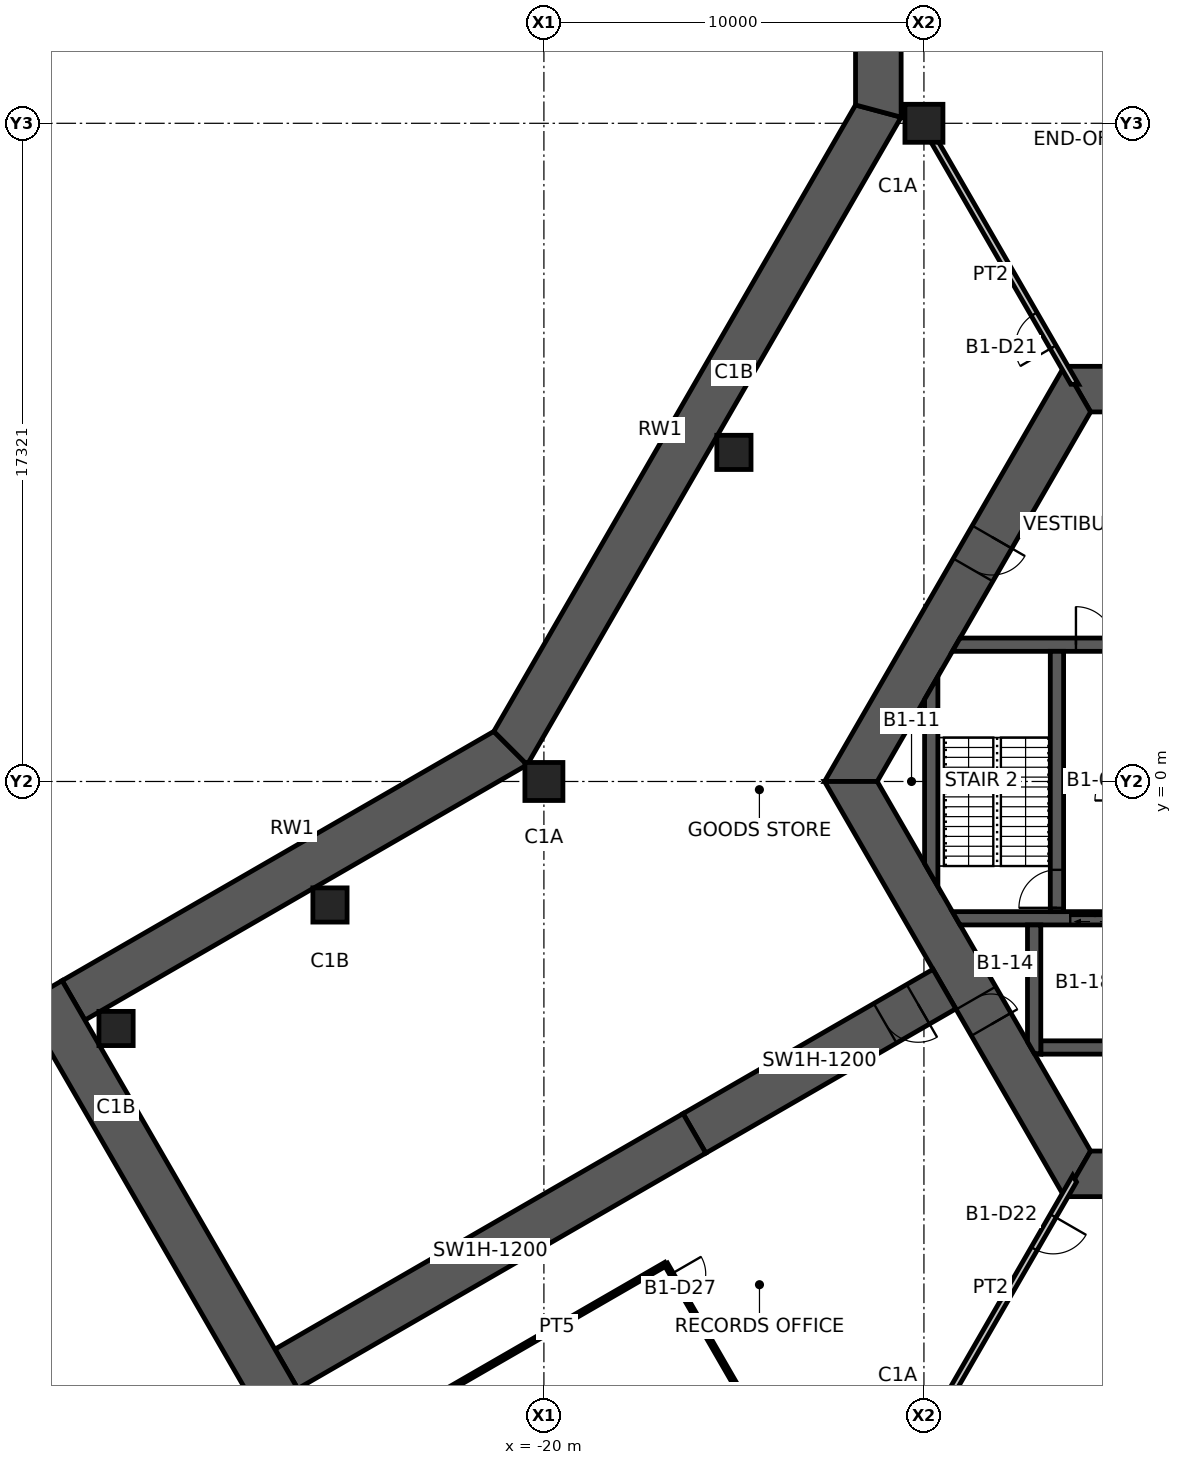
"""IFC4 building model, lengths in metres.
Left out: names, types, materials, properties, quantities, classifications, styles, units other than length and angle.
Written with IfcOpenShell. Run it as: python <this file> out.ifc"""

import sys

from ifc_helpers import new_model, si_unit, direction, frame, frame_2d, origin, origin_2d, place, context, subcontext, project, spatial, polyline, rectangle, hollow_rectangle, outline, extrude, element, fill, save


model = new_model("IFC4")
c1 = context("Model", 3, precision=1e-05, world=origin(), true_north=direction((0.0, 1.0)))
c2 = subcontext(c1, "Body", "Model", "MODEL_VIEW")
j1 = project(units=[si_unit("LENGTHUNIT", "METRE"), si_unit("PLANEANGLEUNIT", "RADIAN")], contexts=[c1])
p1 = place(None, origin())
s1 = spatial("IfcSite", under=j1, at=p1, CompositionType="ELEMENT")
p2 = place(p1, origin())
s2 = spatial("IfcBuilding", under=s1, at=p2, CompositionType="ELEMENT")
p3 = place(p2, frame((0.0, 0.0, -5.0)))
s3 = spatial("IfcBuildingStorey", under=s2, at=p3, CompositionType="ELEMENT", Elevation=-5.0)
for number, where, z_axis, x_axis in (
    (1, (-10.0, 17.321, 0.0), (0.0, 0.0, 1.0), (1.0, 0.0, 0.0)),
    (2, (-20.0, 0.0, 0.0), (0.0, 0.0, 1.0), (1.0, 0.0, 0.0)),
):
    element("IfcColumn", number, at=place(p3, frame(where, z_axis=z_axis, x_axis=x_axis)), inside=s3, PredefinedType="COLUMN", context=c2, shape_type="SweptSolid", body=[
        extrude(hollow_rectangle(XDim=1.0, YDim=1.0, WallThickness=0.06, at=origin_2d()), origin(), (0.0, 0.0, 1.0), 5.0),
    ])
for number, where, z_axis, x_axis in (
    (3, (-15.0, 8.66, 0.0), (0.0, 0.0, 1.0), (1.0, 0.0, 0.0)),
    (4, (-25.629, -3.25, 0.0), (0.0, 0.0, 1.0), (1.0, 0.0, 0.0)),
    (5, (-31.258, -6.5, 0.0), (0.0, 0.0, 1.0), (1.0, 0.0, 0.0)),
):
    element("IfcColumn", number, at=place(p3, frame(where, z_axis=z_axis, x_axis=x_axis)), inside=s3, PredefinedType="COLUMN", context=c2, shape_type="SweptSolid", body=[
        extrude(hollow_rectangle(XDim=0.9, YDim=0.9, WallThickness=0.05, at=origin_2d()), origin(), (0.0, 0.0, 1.0), 5.0),
    ])
p4 = place(p3, frame((5.961, 10.325, 0.0), z_axis=(0.0, 0.0, 1.0), x_axis=(-1.0, 0.0, 0.0)))
e6 = element("IfcWall", 6, at=p4, inside=s3, PredefinedType="SHEAR", context=c2, shape_type="SweptSolid", body=[
    extrude(outline(polyline([(-0.346, -0.6), (4.574, -0.6), (5.374, -0.6), (6.549, -0.6), (7.349, -0.6), (12.269, -0.6), (11.576, 0.6), (7.349, 0.6), (6.549, 0.6), (5.374, 0.6), (4.574, 0.6), (0.346, 0.6), (-0.346, -0.6)])), origin(), (0.0, 0.0, 1.0), 5.0),
])
p5 = place(p4, frame((6.549, 0.0, 0.0)))
e7 = element("IfcOpeningElement", 7, at=p5, cuts=e6, PredefinedType="OPENING", context=c2, shape_type="SweptSolid", body=[
    extrude(rectangle(XDim=0.8, YDim=2.1, at=frame_2d((0.4, 1.05))), frame((0.0, 0.61, 0.0), z_axis=(0.0, -1.0, 0.0), x_axis=(1.0, 0.0, 0.0)), (0.0, 0.0, 1.0), 1.22),
])
p6 = place(p4, frame((4.574, 0.0, 0.0)))
e8 = element("IfcOpeningElement", 8, at=p6, cuts=e6, PredefinedType="OPENING", context=c2, shape_type="SweptSolid", body=[
    extrude(rectangle(XDim=0.8, YDim=2.1, at=frame_2d((0.4, 1.05))), frame((0.0, 0.61, 0.0), z_axis=(0.0, -1.0, 0.0), x_axis=(1.0, 0.0, 0.0)), (0.0, 0.0, 1.0), 1.22),
])
p7 = place(p3, frame((-5.961, 10.325, 0.0), z_axis=(0.0, 0.0, 1.0), x_axis=(-0.500004296715, -0.866022923061, 0.0)))
e9 = element("IfcWall", 9, at=p7, inside=s3, PredefinedType="SHEAR", context=c2, shape_type="SweptSolid", body=[
    extrude(outline(polyline([(-0.346, -0.6), (4.494, -0.6), (5.494, -0.6), (12.269, -0.6), (11.576, 0.6), (5.494, 0.6), (4.494, 0.6), (0.346, 0.6), (-0.346, -0.6)])), origin(), (0.0, 0.0, 1.0), 5.0),
])
p8 = place(p7, frame((4.494, 0.0, 0.0)))
e10 = element("IfcOpeningElement", 10, at=p8, cuts=e9, PredefinedType="OPENING", context=c2, shape_type="SweptSolid", body=[
    extrude(rectangle(XDim=1.0, YDim=2.1, at=frame_2d((0.5, 1.05))), frame((0.0, 0.61, 0.0), z_axis=(0.0, -1.0, 0.0), x_axis=(1.0, 0.0, 0.0)), (0.0, 0.0, 1.0), 1.22),
])
p9 = place(p3, frame((-11.922, 0.0, 0.0), z_axis=(0.0, 0.0, 1.0), x_axis=(0.500004296715, -0.866022923061, 0.0)))
e11 = element("IfcWall", 11, at=p9, inside=s3, PredefinedType="SHEAR", context=c2, shape_type="SweptSolid", body=[
    extrude(outline(polyline([(-0.346, -0.6), (6.581, -0.6), (7.381, -0.6), (12.269, -0.6), (11.576, 0.6), (7.381, 0.6), (6.581, 0.6), (0.346, 0.6), (-0.346, -0.6)])), origin(), (0.0, 0.0, 1.0), 5.0),
])
p10 = place(p9, frame((6.581, 0.0, 0.0)))
e12 = element("IfcOpeningElement", 12, at=p10, cuts=e11, PredefinedType="OPENING", context=c2, shape_type="SweptSolid", body=[
    extrude(rectangle(XDim=0.8, YDim=2.1, at=frame_2d((0.4, 1.05))), frame((0.0, 0.61, 0.0), z_axis=(0.0, -1.0, 0.0), x_axis=(1.0, 0.0, 0.0)), (0.0, 0.0, 1.0), 1.22),
])
p11 = place(p3, frame((-5.961, -10.325, 0.0), z_axis=(0.0, 0.0, 1.0), x_axis=(1.0, 0.0, 0.0)))
e13 = element("IfcWall", 13, at=p11, inside=s3, PredefinedType="SHEAR", context=c2, shape_type="SweptSolid", body=[
    extrude(outline(polyline([(-0.346, -0.6), (5.461, -0.6), (6.461, -0.6), (12.269, -0.6), (11.576, 0.6), (6.461, 0.6), (5.461, 0.6), (0.346, 0.6), (-0.346, -0.6)])), origin(), (0.0, 0.0, 1.0), 5.0),
])
p12 = place(p11, frame((5.461, 0.0, 0.0)))
e14 = element("IfcOpeningElement", 14, at=p12, cuts=e13, PredefinedType="OPENING", context=c2, shape_type="SweptSolid", body=[
    extrude(rectangle(XDim=1.0, YDim=2.1, at=frame_2d((0.5, 1.05))), frame((0.0, 0.61, 0.0), z_axis=(0.0, -1.0, 0.0), x_axis=(1.0, 0.0, 0.0)), (0.0, 0.0, 1.0), 1.22),
])
p13 = place(p3, frame((-9.461, -5.462, 0.0), z_axis=(0.0, 0.0, 1.0), x_axis=(-0.866019116917, -0.500010889016, 0.0)))
e15 = element("IfcWall", 15, at=p13, inside=s3, PredefinedType="SHEAR", context=c2, shape_type="SweptSolid", body=[
    extrude(rectangle(XDim=7.595, YDim=1.2, at=frame_2d((3.798, 0.0))), origin(), (0.0, 0.0, 1.0), 5.0),
])
p14 = place(p13, frame((0.8, 0.0, 0.0)))
e16 = element("IfcOpeningElement", 16, at=p14, cuts=e15, PredefinedType="OPENING", context=c2, shape_type="SweptSolid", body=[
    extrude(rectangle(XDim=1.0, YDim=2.1, at=frame_2d((0.5, 1.05))), frame((0.0, 0.61, 0.0), z_axis=(0.0, -1.0, 0.0), x_axis=(1.0, 0.0, 0.0)), (0.0, 0.0, 1.0), 1.22),
])
p15 = place(p3, frame((-16.039, -9.26, 0.0), z_axis=(0.0, 0.0, 1.0), x_axis=(-0.866023285932, -0.50000366821, 0.0)))
e17 = element("IfcWall", 17, at=p15, inside=s3, PredefinedType="SHEAR", context=c2, shape_type="SweptSolid", body=[
    extrude(rectangle(XDim=12.4, YDim=1.2, at=frame_2d((6.2, 0.0))), origin(), (0.0, 0.0, 1.0), 5.0),
])
p16 = place(p3, frame((-32.378, -5.761, 0.0), z_axis=(0.0, 0.0, 1.0), x_axis=(0.866028209229, 0.499995140796, 0.0)))
e18 = element("IfcWall", 18, at=p16, inside=s3, PredefinedType="SOLIDWALL", context=c2, shape_type="SweptSolid", body=[
    extrude(outline(polyline([(0.0, -0.6), (13.439, -0.6), (13.118, 0.6), (0.0, 0.6), (0.0, -0.6)])), origin(), (0.0, 0.0, 1.0), 5.0),
])
p17 = place(p3, frame((-20.878, 0.878, 0.0), z_axis=(0.0, 0.0, 1.0), x_axis=(0.499998307868, 0.866026380735, 0.0)))
e19 = element("IfcWall", 19, at=p17, inside=s3, PredefinedType="SOLIDWALL", context=c2, shape_type="SweptSolid", body=[
    extrude(outline(polyline([(-0.161, -0.6), (19.518, -0.6), (19.196, 0.6), (0.161, 0.6), (-0.161, -0.6)])), origin(), (0.0, 0.0, 1.0), 5.0),
])
p18 = place(p3, frame((-11.2, 17.642, 0.0), z_axis=(0.0, 0.0, 1.0), x_axis=(0.0, 1.0, 0.0)))
e20 = element("IfcWall", 20, at=p18, inside=s3, PredefinedType="SOLIDWALL", context=c2, shape_type="SweptSolid", body=[
    extrude(outline(polyline([(-0.161, -0.6), (13.278, -0.6), (13.278, 0.6), (0.161, 0.6), (-0.161, -0.6)])), origin(), (0.0, 0.0, 1.0), 5.0),
])
p19 = place(p3, frame((-21.397, -25.979, 0.0), z_axis=(0.0, 0.0, 1.0), x_axis=(-0.500005427746, 0.866022270051, 0.0)))
e21 = element("IfcWall", 21, at=p19, inside=s3, PredefinedType="SOLIDWALL", context=c2, shape_type="SweptSolid", body=[
    extrude(rectangle(XDim=23.6, YDim=1.2, at=frame_2d((11.8, 0.0))), origin(), (0.0, 0.0, 1.0), 5.0),
])
p20 = place(p3, frame((-9.151, 3.6, 0.0), z_axis=(0.0, 0.0, 1.0), x_axis=(1.0, 0.0, 0.0)))
e22 = element("IfcWall", 22, at=p20, inside=s3, PredefinedType="SHEAR", context=c2, shape_type="SweptSolid", body=[
    extrude(outline(polyline([(-0.101, -0.175), (3.151, -0.175), (4.151, -0.175), (7.726, -0.175), (7.726, 0.175), (4.151, 0.175), (3.151, 0.175), (0.101, 0.175), (-0.101, -0.175)])), origin(), (0.0, 0.0, 1.0), 5.0),
])
p21 = place(p20, frame((3.151, 0.0, 0.0)))
e23 = element("IfcOpeningElement", 23, at=p21, cuts=e22, PredefinedType="OPENING", context=c2, shape_type="SweptSolid", body=[
    extrude(rectangle(XDim=1.0, YDim=2.1, at=frame_2d((0.5, 1.05))), frame((0.0, 0.185, 0.0), z_axis=(0.0, -1.0, 0.0), x_axis=(1.0, 0.0, 0.0)), (0.0, 0.0, 1.0), 0.37),
])
p22 = place(p3, frame((-9.151, -3.6, 0.0), z_axis=(0.0, 0.0, 1.0), x_axis=(1.0, 0.0, 0.0)))
e24 = element("IfcWall", 24, at=p22, inside=s3, PredefinedType="SHEAR", context=c2, shape_type="SweptSolid", body=[
    extrude(outline(polyline([(0.101, -0.175), (3.001, -0.175), (4.301, -0.175), (7.726, -0.175), (7.726, 0.175), (4.301, 0.175), (3.001, 0.175), (-0.101, 0.175), (0.101, -0.175)])), origin(), (0.0, 0.0, 1.0), 5.0),
])
p23 = place(p22, frame((3.001, 0.0, 0.0)))
e25 = element("IfcOpeningElement", 25, at=p23, cuts=e24, PredefinedType="OPENING", context=c2, shape_type="SweptSolid", body=[
    extrude(rectangle(XDim=1.3, YDim=2.1, at=frame_2d((0.65, 1.05))), frame((0.0, 0.185, 0.0), z_axis=(0.0, -1.0, 0.0), x_axis=(1.0, 0.0, 0.0)), (0.0, 0.0, 1.0), 0.37),
])
p24 = place(p3, frame((-6.5, -3.425, 0.0), z_axis=(0.0, 0.0, 1.0), x_axis=(0.0, 1.0, 0.0)))
e26 = element("IfcWall", 26, at=p24, inside=s3, PredefinedType="SHEAR", context=c2, shape_type="SweptSolid", body=[
    extrude(rectangle(XDim=6.85, YDim=0.35, at=frame_2d((3.425, 0.0))), origin(), (0.0, 0.0, 1.0), 5.0),
])
p25 = place(p24, frame((0.1, 0.0, 0.0)))
e27 = element("IfcOpeningElement", 27, at=p25, cuts=e26, PredefinedType="OPENING", context=c2, shape_type="SweptSolid", body=[
    extrude(rectangle(XDim=1.0, YDim=2.1, at=frame_2d((0.5, 1.05))), frame((0.0, 0.185, 0.0), z_axis=(0.0, -1.0, 0.0), x_axis=(1.0, 0.0, 0.0)), (0.0, 0.0, 1.0), 0.37),
])
p26 = place(p3, frame((-6.925, -7.0, 0.0), z_axis=(0.0, 0.0, 1.0), x_axis=(1.0, 0.0, 0.0)))
e28 = element("IfcWall", 28, at=p26, inside=s3, PredefinedType="SHEAR", context=c2, shape_type="SweptSolid", body=[
    extrude(rectangle(XDim=2.25, YDim=0.35, at=frame_2d((1.125, 0.0))), origin(), (0.0, 0.0, 1.0), 5.0),
])
p27 = place(p3, frame((-7.1, -3.775, 0.0), z_axis=(0.0, 0.0, 1.0), x_axis=(0.0, -1.0, 0.0)))
e29 = element("IfcWall", 29, at=p27, inside=s3, PredefinedType="SHEAR", context=c2, shape_type="SweptSolid", body=[
    extrude(outline(polyline([(0.0, -0.175), (3.074, -0.175), (3.377, 0.0), (3.4, 0.175), (0.0, 0.175), (0.0, -0.175)])), origin(), (0.0, 0.0, 1.0), 5.0),
])
p28 = place(p3, frame((-9.808, -2.462, 0.0), z_axis=(0.0, 0.0, 1.0), x_axis=(0.0, 1.0, 0.0)))
e30 = element("IfcWall", 30, at=p28, inside=s3, PredefinedType="SHEAR", context=c2, shape_type="SweptSolid", body=[
    extrude(outline(polyline([(-0.303, -0.175), (5.228, -0.175), (4.621, 0.175), (0.303, 0.175), (-0.303, -0.175)])), origin(), (0.0, 0.0, 1.0), 5.0),
])
p29 = place(p3, frame((-6.035, 10.453, 0.0), z_axis=(0.0, 0.0, 1.0), x_axis=(-0.499993402427, 0.866029212861, 0.0)))
e31 = element("IfcWall", 31, at=p29, inside=s3, PredefinedType="PARTITIONING", context=c2, shape_type="SweptSolid", body=[
    extrude(outline(polyline([(-0.051, -0.087), (1.129, -0.087), (2.129, -0.087), (7.93, -0.087), (7.93, 0.087), (2.129, 0.087), (1.129, 0.087), (0.051, 0.087), (-0.051, -0.087)])), origin(), (0.0, 0.0, 1.0), 3.8),
])
p30 = place(p29, frame((1.129, 0.0, 0.0)))
e32 = element("IfcOpeningElement", 32, at=p30, cuts=e31, PredefinedType="OPENING", context=c2, shape_type="SweptSolid", body=[
    extrude(rectangle(XDim=1.0, YDim=2.1, at=frame_2d((0.5, 1.05))), frame((0.0, 0.098, 0.0), z_axis=(0.0, -1.0, 0.0), x_axis=(1.0, 0.0, 0.0)), (0.0, 0.0, 1.0), 0.195),
])
p31 = place(p3, frame((-6.035, -10.453, 0.0), z_axis=(0.0, 0.0, 1.0), x_axis=(-0.499993402427, -0.866029212861, 0.0)))
e33 = element("IfcWall", 33, at=p31, inside=s3, PredefinedType="PARTITIONING", context=c2, shape_type="SweptSolid", body=[
    extrude(outline(polyline([(-0.051, -0.087), (1.129, -0.087), (2.129, -0.087), (7.93, -0.087), (7.93, 0.087), (2.129, 0.087), (1.129, 0.087), (0.051, 0.087), (-0.051, -0.087)])), origin(), (0.0, 0.0, 1.0), 3.8),
])
p32 = place(p31, frame((1.129, 0.0, 0.0)))
e34 = element("IfcOpeningElement", 34, at=p32, cuts=e33, PredefinedType="OPENING", context=c2, shape_type="SweptSolid", body=[
    extrude(rectangle(XDim=1.0, YDim=2.1, at=frame_2d((0.5, 1.05))), frame((0.0, 0.098, 0.0), z_axis=(0.0, -1.0, 0.0), x_axis=(1.0, 0.0, 0.0)), (0.0, 0.0, 1.0), 0.195),
])
p33 = place(p3, frame((-22.525, -16.007, 0.0), z_axis=(0.0, 0.0, 1.0), x_axis=(0.866021597574, 0.500006592492, 0.0)))
e35 = element("IfcWall", 35, at=p33, inside=s3, PredefinedType="PARTITIONING", context=c2, shape_type="SweptSolid", body=[
    extrude(rectangle(XDim=6.62, YDim=0.1, at=frame_2d((3.31, 0.0))), origin(), (0.0, 0.0, 1.0), 3.7),
])
p34 = place(p3, frame((-16.792, -12.697, 0.0), z_axis=(0.0, 0.0, 1.0), x_axis=(0.499998759335, -0.866026120082, 0.0)))
e36 = element("IfcWall", 36, at=p34, inside=s3, PredefinedType="PARTITIONING", context=c2, shape_type="SweptSolid", body=[
    extrude(rectangle(XDim=7.98, YDim=0.1, at=frame_2d((3.99, 0.0))), origin(), (0.0, 0.0, 1.0), 3.7),
])
p35 = place(p34, frame((0.3, 0.0, 0.0)))
e37 = element("IfcOpeningElement", 37, at=p35, cuts=e36, PredefinedType="OPENING", context=c2, shape_type="SweptSolid", body=[
    extrude(rectangle(XDim=0.9, YDim=2.1, at=frame_2d((0.45, 1.05))), frame((0.0, 0.06, 0.0), z_axis=(0.0, -1.0, 0.0), x_axis=(1.0, 0.0, 0.0)), (0.0, 0.0, 1.0), 0.12),
])
p36 = place(p10, origin())
e38 = element("IfcDoor", 38, at=p36, inside=s3, OperationType="SINGLE_SWING_RIGHT", PredefinedType="DOOR", context=c2, shape_type="SweptSolid", body=[
    extrude(rectangle(XDim=0.8, YDim=2.1, at=frame_2d((0.4, 1.05))), frame((0.0, 0.025, 0.0), z_axis=(0.0, -1.0, 0.0), x_axis=(1.0, 0.0, 0.0)), (0.0, 0.0, 1.0), 0.05),
])
fill(e12, e38)
p37 = place(p8, origin())
e39 = element("IfcDoor", 39, at=p37, inside=s3, OperationType="SINGLE_SWING_LEFT", PredefinedType="DOOR", context=c2, shape_type="SweptSolid", body=[
    extrude(rectangle(XDim=1.0, YDim=2.1, at=frame_2d((0.5, 1.05))), frame((0.0, 0.025, 0.0), z_axis=(0.0, -1.0, 0.0), x_axis=(1.0, 0.0, 0.0)), (0.0, 0.0, 1.0), 0.05),
])
fill(e10, e39)
p38 = place(p25, origin())
e40 = element("IfcDoor", 40, at=p38, inside=s3, OperationType="SINGLE_SWING_LEFT", PredefinedType="DOOR", context=c2, shape_type="SweptSolid", body=[
    extrude(rectangle(XDim=1.0, YDim=2.1, at=frame_2d((0.5, 1.05))), frame((0.0, 0.025, 0.0), z_axis=(0.0, -1.0, 0.0), x_axis=(1.0, 0.0, 0.0)), (0.0, 0.0, 1.0), 0.05),
])
fill(e27, e40)
p39 = place(p21, origin())
e41 = element("IfcDoor", 41, at=p39, inside=s3, OperationType="SINGLE_SWING_LEFT", PredefinedType="DOOR", context=c2, shape_type="SweptSolid", body=[
    extrude(rectangle(XDim=1.0, YDim=2.1, at=frame_2d((0.5, 1.05))), frame((0.0, 0.025, 0.0), z_axis=(0.0, -1.0, 0.0), x_axis=(1.0, 0.0, 0.0)), (0.0, 0.0, 1.0), 0.05),
])
fill(e23, e41)
p40 = place(p14, origin())
e42 = element("IfcDoor", 42, at=p40, inside=s3, OperationType="SINGLE_SWING_LEFT", PredefinedType="DOOR", context=c2, shape_type="SweptSolid", body=[
    extrude(rectangle(XDim=1.0, YDim=2.1, at=frame_2d((0.5, 1.05))), frame((0.0, 0.025, 0.0), z_axis=(0.0, -1.0, 0.0), x_axis=(1.0, 0.0, 0.0)), (0.0, 0.0, 1.0), 0.05),
])
fill(e16, e42)
p41 = place(p30, origin())
e43 = element("IfcDoor", 43, at=p41, inside=s3, OperationType="SINGLE_SWING_LEFT", PredefinedType="DOOR", context=c2, shape_type="SweptSolid", body=[
    extrude(rectangle(XDim=1.0, YDim=2.1, at=frame_2d((0.5, 1.05))), frame((0.0, 0.025, 0.0), z_axis=(0.0, -1.0, 0.0), x_axis=(1.0, 0.0, 0.0)), (0.0, 0.0, 1.0), 0.05),
])
fill(e32, e43)
p42 = place(p32, origin())
e44 = element("IfcDoor", 44, at=p42, inside=s3, OperationType="SINGLE_SWING_LEFT", PredefinedType="DOOR", context=c2, shape_type="SweptSolid", body=[
    extrude(rectangle(XDim=1.0, YDim=2.1, at=frame_2d((0.5, 1.05))), frame((0.0, 0.025, 0.0), z_axis=(0.0, -1.0, 0.0), x_axis=(1.0, 0.0, 0.0)), (0.0, 0.0, 1.0), 0.05),
])
fill(e34, e44)
p43 = place(p35, origin())
e45 = element("IfcDoor", 45, at=p43, inside=s3, OperationType="SINGLE_SWING_LEFT", PredefinedType="DOOR", context=c2, shape_type="SweptSolid", body=[
    extrude(rectangle(XDim=0.9, YDim=2.1, at=frame_2d((0.45, 1.05))), frame((0.0, 0.025, 0.0), z_axis=(0.0, -1.0, 0.0), x_axis=(1.0, 0.0, 0.0)), (0.0, 0.0, 1.0), 0.05),
])
fill(e37, e45)
p44 = place(p23, origin())
e46 = element("IfcDoor", 46, at=p44, inside=s3, OperationType="DOUBLE_DOOR_SLIDING", PredefinedType="DOOR", context=c2, shape_type="SweptSolid", body=[
    extrude(rectangle(XDim=1.3, YDim=2.1, at=frame_2d((0.65, 1.05))), frame((0.0, 0.025, 0.0), z_axis=(0.0, -1.0, 0.0), x_axis=(1.0, 0.0, 0.0)), (0.0, 0.0, 1.0), 0.05),
])
fill(e25, e46)
save(model, sys.argv[1])
